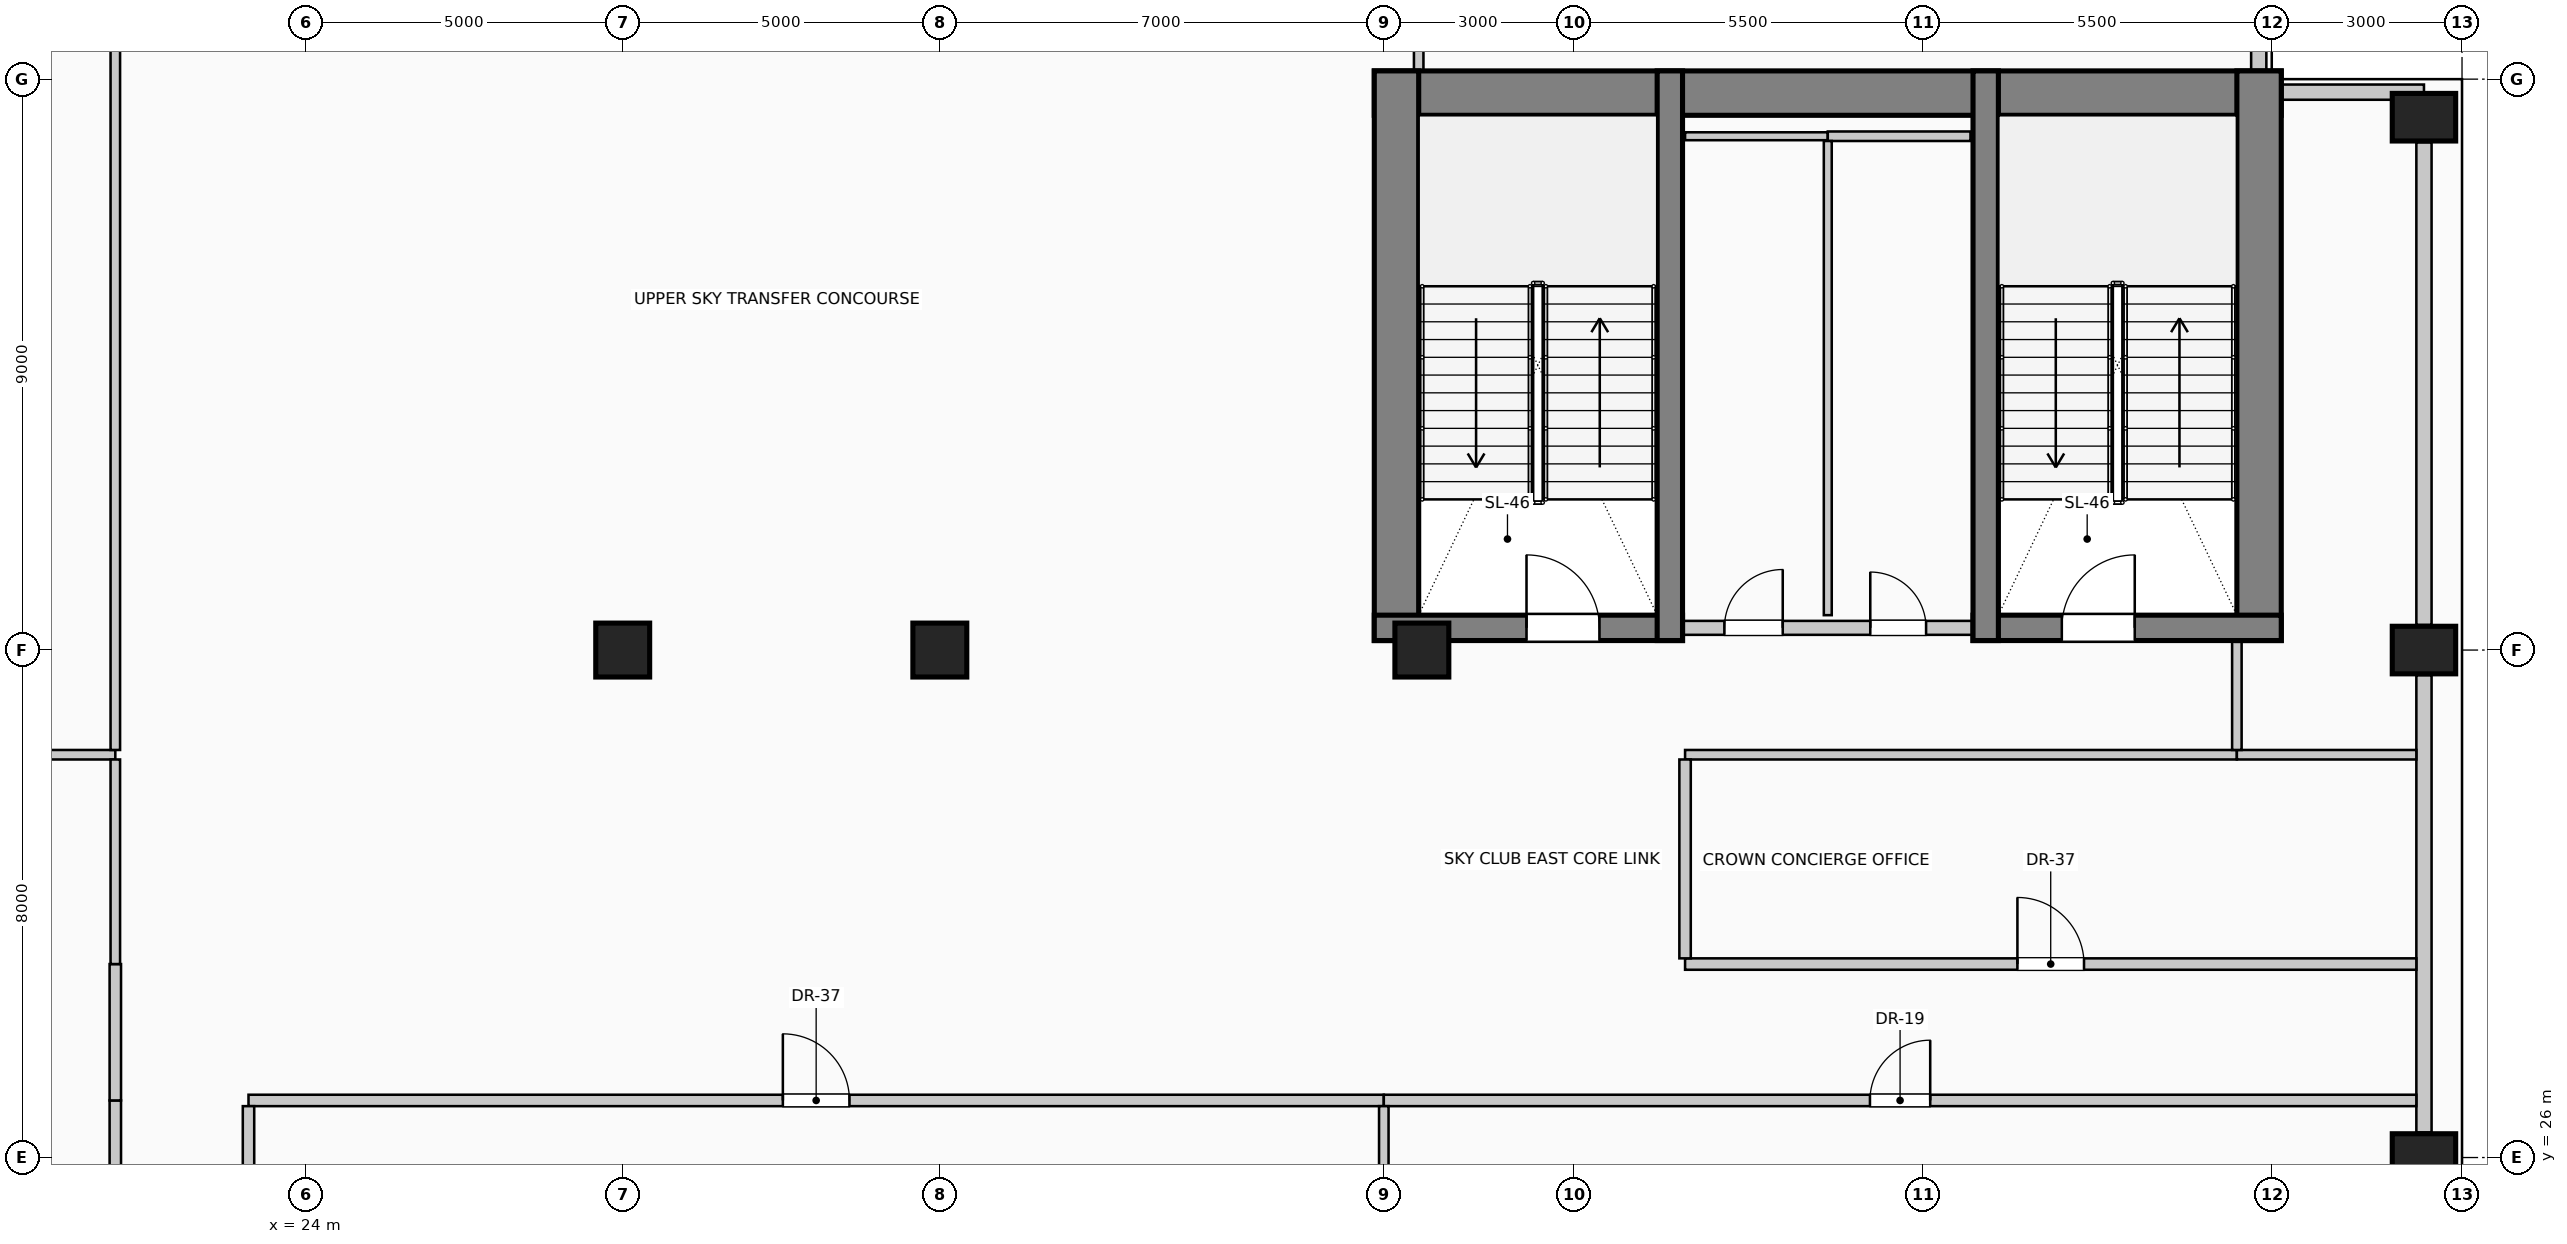
"""IFC4 building model, lengths in metres.
Left out: names, types, materials, properties, quantities, classifications, styles, units other than length and angle.
Written with IfcOpenShell. Run it as: python <this file> out.ifc"""

import sys

from ifc_helpers import new_model, si_unit, direction, frame, frame_2d, origin, origin_2d, place, context, subcontext, project, spatial, rectangle, circle, extrude, element, fill, save


model = new_model("IFC4")
c1 = context("Model", 3, precision=1e-05, world=origin(), true_north=direction((0.0, 1.0)))
c2 = subcontext(c1, "Body", "Model", "MODEL_VIEW")
j1 = project(units=[si_unit("LENGTHUNIT", "METRE"), si_unit("PLANEANGLEUNIT", "RADIAN")], contexts=[c1])
p1 = place(None, origin())
s1 = spatial("IfcSite", under=j1, at=p1, CompositionType="ELEMENT")
p2 = place(p1, origin())
s2 = spatial("IfcBuilding", under=s1, at=p2, CompositionType="ELEMENT")
p3 = place(p2, frame((0.0, 0.0, 243.8)))
s3 = spatial("IfcBuildingStorey", under=s2, at=p3, CompositionType="ELEMENT", Elevation=243.8)
p4 = place(p3, frame((40.85, 42.78, 0.0), z_axis=(0.0, 0.0, 1.0), x_axis=(1.0, 0.0, 0.0)))
e1 = element("IfcWall", 1, at=p4, inside=s3, PredefinedType="SHEAR", context=c2, shape_type="SweptSolid", body=[
    extrude(rectangle(XDim=14.3, YDim=0.7, at=frame_2d((7.15, 0.0))), origin(), (0.0, 0.0, 1.0), 4.8),
])
for number, where, z_axis, x_axis in (
    (2, (41.2, 34.15, 0.0), (0.0, 0.0, 1.0), (0.0, 1.0, 0.0)),
    (3, (54.8, 34.15, 0.0), (0.0, 0.0, 1.0), (0.0, 1.0, 0.0)),
):
    element("IfcWall", number, at=place(p3, frame(where, z_axis=z_axis, x_axis=x_axis)), inside=s3, PredefinedType="SHEAR", context=c2, shape_type="SweptSolid", body=[
        extrude(rectangle(XDim=8.98, YDim=0.7, at=frame_2d((4.49, 0.0))), origin(), (0.0, 0.0, 1.0), 4.8),
    ])
p5 = place(p3, frame((40.85, 34.35, 0.0), z_axis=(0.0, 0.0, 1.0), x_axis=(1.0, 0.0, 0.0)))
e4 = element("IfcWall", 4, at=p5, inside=s3, PredefinedType="SHEAR", context=c2, shape_type="SweptSolid", body=[
    extrude(rectangle(XDim=4.86, YDim=0.4, at=frame_2d((2.43, 0.0))), origin(), (0.0, 0.0, 1.0), 4.8),
])
p6 = place(p5, frame((2.4, 0.0, 0.0)))
e5 = element("IfcOpeningElement", 5, at=p6, cuts=e4, PredefinedType="OPENING", context=c2, shape_type="SweptSolid", body=[
    extrude(rectangle(XDim=1.15, YDim=2.2, at=frame_2d((0.575, 1.1))), frame((0.0, 0.21, 0.0), z_axis=(0.0, -1.0, 0.0), x_axis=(1.0, 0.0, 0.0)), (0.0, 0.0, 1.0), 0.42),
])
p7 = place(p3, frame((45.51, 34.15, 0.0), z_axis=(0.0, 0.0, 1.0), x_axis=(0.0, 1.0, 0.0)))
e6 = element("IfcWall", 6, at=p7, inside=s3, PredefinedType="SHEAR", context=c2, shape_type="SweptSolid", body=[
    extrude(rectangle(XDim=8.98, YDim=0.4, at=frame_2d((4.49, 0.0))), origin(), (0.0, 0.0, 1.0), 4.8),
])
p8 = place(p3, frame((50.29, 34.35, 0.0), z_axis=(0.0, 0.0, 1.0), x_axis=(1.0, 0.0, 0.0)))
e7 = element("IfcWall", 7, at=p8, inside=s3, PredefinedType="SHEAR", context=c2, shape_type="SweptSolid", body=[
    extrude(rectangle(XDim=4.86, YDim=0.4, at=frame_2d((2.43, 0.0))), origin(), (0.0, 0.0, 1.0), 4.8),
])
p9 = place(p8, frame((1.4, 0.0, 0.0)))
e8 = element("IfcOpeningElement", 8, at=p9, cuts=e7, PredefinedType="OPENING", context=c2, shape_type="SweptSolid", body=[
    extrude(rectangle(XDim=1.15, YDim=2.2, at=frame_2d((0.575, 1.1))), frame((0.0, 0.21, 0.0), z_axis=(0.0, -1.0, 0.0), x_axis=(1.0, 0.0, 0.0)), (0.0, 0.0, 1.0), 0.42),
])
p10 = place(p3, frame((50.49, 34.15, 0.0), z_axis=(0.0, 0.0, 1.0), x_axis=(0.0, 1.0, 0.0)))
e9 = element("IfcWall", 9, at=p10, inside=s3, PredefinedType="SHEAR", context=c2, shape_type="SweptSolid", body=[
    extrude(rectangle(XDim=8.98, YDim=0.4, at=frame_2d((4.49, 0.0))), origin(), (0.0, 0.0, 1.0), 4.8),
])
for number, where, z_axis, x_axis in (
    (10, (57.4, 26.0, 0.0), (0.0, 0.0, 1.0), (0.0, 1.0, 0.0)),
    (11, (57.4, 34.0, 0.0), (0.0, 0.0, 1.0), (0.0, 1.0, 0.0)),
    (12, (57.4, 42.4, 0.0), (0.0, 0.0, 1.0), (0.0, 1.0, 0.0)),
):
    element("IfcColumn", number, at=place(p3, frame(where, z_axis=z_axis, x_axis=x_axis)), inside=s3, PredefinedType="COLUMN", context=c2, shape_type="SweptSolid", body=[
        extrude(rectangle(XDim=0.75, YDim=1.0, at=origin_2d()), origin(), (0.0, 0.0, 1.0), 4.8),
    ])
for number, where, z_axis, x_axis in (
    (13, (29.0, 34.0, 0.0), (0.0, 0.0, 1.0), (1.0, 0.0, 0.0)),
    (14, (41.6, 34.0, 0.0), (0.0, 0.0, 1.0), (1.0, 0.0, 0.0)),
    (15, (34.0, 34.0, 0.0), (0.0, 0.0, 1.0), (1.0, 0.0, 0.0)),
):
    element("IfcColumn", number, at=place(p3, frame(where, z_axis=z_axis, x_axis=x_axis)), inside=s3, PredefinedType="COLUMN", context=c2, shape_type="SweptSolid", body=[
        extrude(circle(Radius=0.425, at=origin_2d()), origin(), (0.0, 0.0, 1.0), 4.8),
    ])
p11 = place(p3, frame((57.4, 33.605, 0.0), z_axis=(0.0, 0.0, 1.0), x_axis=(0.0, -1.0, 0.0)))
e16 = element("IfcWall", 16, at=p11, inside=s3, PredefinedType="SOLIDWALL", context=c2, shape_type="SweptSolid", body=[
    extrude(rectangle(XDim=7.21, YDim=0.24, at=frame_2d((3.605, 0.0))), origin(), (0.0, 0.0, 1.0), 3.8),
])
p12 = place(p3, frame((57.4, 42.005, 0.0), z_axis=(0.0, 0.0, 1.0), x_axis=(0.0, -1.0, 0.0)))
e17 = element("IfcWall", 17, at=p12, inside=s3, PredefinedType="SOLIDWALL", context=c2, shape_type="SweptSolid", body=[
    extrude(rectangle(XDim=7.61, YDim=0.24, at=frame_2d((3.805, 0.0))), origin(), (0.0, 0.0, 1.0), 3.8),
])
p13 = place(p3, frame((54.795, 45.4, 0.0), z_axis=(0.0, 0.0, 1.0), x_axis=(0.0, -1.0, 0.0)))
e18 = element("IfcWall", 18, at=p13, inside=s3, PredefinedType="SOLIDWALL", context=c2, shape_type="SweptSolid", body=[
    extrude(rectangle(XDim=2.265, YDim=0.24, at=frame_2d((1.132, 0.0))), origin(), (0.0, 0.0, 1.0), 4.55),
])
p14 = place(p3, frame((55.155, 42.795, 0.0), z_axis=(0.0, 0.0, 1.0), x_axis=(1.0, 0.0, 0.0)))
e19 = element("IfcWall", 19, at=p14, inside=s3, PredefinedType="SOLIDWALL", context=c2, shape_type="SweptSolid", body=[
    extrude(rectangle(XDim=2.245, YDim=0.24, at=frame_2d((1.123, 0.0))), origin(), (0.0, 0.0, 1.0), 4.55),
])
p15 = place(p3, frame((45.72, 34.35, 0.0), z_axis=(0.0, 0.0, 1.0), x_axis=(1.0, 0.0, 0.0)))
e20 = element("IfcWall", 20, at=p15, inside=s3, PredefinedType="PARTITIONING", context=c2, shape_type="SweptSolid", body=[
    extrude(rectangle(XDim=4.56, YDim=0.22, at=frame_2d((2.28, 0.0))), origin(), (0.0, 0.0, 1.0), 4.55),
])
p16 = place(p15, frame((0.65, 0.0, 0.0)))
e21 = element("IfcOpeningElement", 21, at=p16, cuts=e20, PredefinedType="OPENING", context=c2, shape_type="SweptSolid", body=[
    extrude(rectangle(XDim=0.92, YDim=2.1, at=frame_2d((0.46, 1.05))), frame((0.0, 0.12, 0.0), z_axis=(0.0, -1.0, 0.0), x_axis=(1.0, 0.0, 0.0)), (0.0, 0.0, 1.0), 0.24),
])
p17 = place(p15, frame((2.95, 0.0, 0.0)))
e22 = element("IfcOpeningElement", 22, at=p17, cuts=e20, PredefinedType="OPENING", context=c2, shape_type="SweptSolid", body=[
    extrude(rectangle(XDim=0.88, YDim=2.1, at=frame_2d((0.44, 1.05))), frame((0.0, 0.12, 0.0), z_axis=(0.0, -1.0, 0.0), x_axis=(1.0, 0.0, 0.0)), (0.0, 0.0, 1.0), 0.24),
])
p18 = place(p3, frame((23.1, 26.9, 0.0), z_axis=(0.0, 0.0, 1.0), x_axis=(1.0, 0.0, 0.0)))
e23 = element("IfcWall", 23, at=p18, inside=s3, PredefinedType="PARTITIONING", context=c2, shape_type="SweptSolid", body=[
    extrude(rectangle(XDim=17.9, YDim=0.18, at=frame_2d((8.95, 0.0))), origin(), (0.0, 0.0, 1.0), 4.55),
])
p19 = place(p18, frame((8.425, 0.0, 0.0)))
e24 = element("IfcOpeningElement", 24, at=p19, cuts=e23, PredefinedType="OPENING", context=c2, shape_type="SweptSolid", body=[
    extrude(rectangle(XDim=1.05, YDim=2.15, at=frame_2d((0.525, 1.075))), frame((0.0, 0.1, 0.0), z_axis=(0.0, -1.0, 0.0), x_axis=(1.0, 0.0, 0.0)), (0.0, 0.0, 1.0), 0.2),
])
p20 = place(p3, frame((41.0, 26.9, 0.0), z_axis=(0.0, 0.0, 1.0), x_axis=(1.0, 0.0, 0.0)))
e25 = element("IfcWall", 25, at=p20, inside=s3, PredefinedType="PARTITIONING", context=c2, shape_type="SweptSolid", body=[
    extrude(rectangle(XDim=16.28, YDim=0.18, at=frame_2d((8.14, 0.0))), origin(), (0.0, 0.0, 1.0), 4.55),
])
p21 = place(p20, frame((7.665, 0.0, 0.0)))
e26 = element("IfcOpeningElement", 26, at=p21, cuts=e25, PredefinedType="OPENING", context=c2, shape_type="SweptSolid", body=[
    extrude(rectangle(XDim=0.95, YDim=2.15, at=frame_2d((0.475, 1.075))), frame((0.0, 0.1, 0.0), z_axis=(0.0, -1.0, 0.0), x_axis=(1.0, 0.0, 0.0)), (0.0, 0.0, 1.0), 0.2),
])
p22 = place(p3, frame((45.75, 29.05, 0.0), z_axis=(0.0, 0.0, 1.0), x_axis=(1.0, 0.0, 0.0)))
e27 = element("IfcWall", 27, at=p22, inside=s3, PredefinedType="PARTITIONING", context=c2, shape_type="SweptSolid", body=[
    extrude(rectangle(XDim=11.53, YDim=0.18, at=frame_2d((5.765, 0.0))), origin(), (0.0, 0.0, 1.0), 4.55),
])
p23 = place(p22, frame((5.24, 0.0, 0.0)))
e28 = element("IfcOpeningElement", 28, at=p23, cuts=e27, PredefinedType="OPENING", context=c2, shape_type="SweptSolid", body=[
    extrude(rectangle(XDim=1.05, YDim=2.15, at=frame_2d((0.525, 1.075))), frame((0.0, 0.1, 0.0), z_axis=(0.0, -1.0, 0.0), x_axis=(1.0, 0.0, 0.0)), (0.0, 0.0, 1.0), 0.2),
])
p24 = place(p3, frame((15.85, 32.35, 0.0), z_axis=(0.0, 0.0, 1.0), x_axis=(1.0, 0.0, 0.0)))
e29 = element("IfcWall", 29, at=p24, inside=s3, PredefinedType="PARTITIONING", context=c2, shape_type="SweptSolid", body=[
    extrude(rectangle(XDim=5.15, YDim=0.15, at=frame_2d((2.575, 0.0))), origin(), (0.0, 0.0, 1.0), 4.55),
])
p25 = place(p3, frame((45.75, 32.35, 0.0), z_axis=(0.0, 0.0, 1.0), x_axis=(1.0, 0.0, 0.0)))
e30 = element("IfcWall", 30, at=p25, inside=s3, PredefinedType="PARTITIONING", context=c2, shape_type="SweptSolid", body=[
    extrude(rectangle(XDim=8.7, YDim=0.15, at=frame_2d((4.35, 0.0))), origin(), (0.0, 0.0, 1.0), 4.55),
])
p26 = place(p3, frame((54.45, 32.35, 0.0), z_axis=(0.0, 0.0, 1.0), x_axis=(1.0, 0.0, 0.0)))
e31 = element("IfcWall", 31, at=p26, inside=s3, PredefinedType="PARTITIONING", context=c2, shape_type="SweptSolid", body=[
    extrude(rectangle(XDim=2.83, YDim=0.15, at=frame_2d((1.415, 0.0))), origin(), (0.0, 0.0, 1.0), 4.55),
])
p27 = place(p3, frame((45.75, 42.1, 0.0), z_axis=(0.0, 0.0, 1.0), x_axis=(1.0, 0.0, 0.0)))
e32 = element("IfcWall", 32, at=p27, inside=s3, PredefinedType="PARTITIONING", context=c2, shape_type="SweptSolid", body=[
    extrude(rectangle(XDim=2.25, YDim=0.125, at=frame_2d((1.125, 0.0))), origin(), (0.0, 0.0, 1.0), 4.55),
])
p28 = place(p3, frame((48.0, 42.1, 0.0), z_axis=(0.0, 0.0, 1.0), x_axis=(1.0, 0.0, 0.0)))
e33 = element("IfcWall", 33, at=p28, inside=s3, PredefinedType="PARTITIONING", context=c2, shape_type="SweptSolid", body=[
    extrude(rectangle(XDim=2.25, YDim=0.15, at=frame_2d((1.125, 0.0))), origin(), (0.0, 0.0, 1.0), 4.55),
])
p29 = place(p3, frame((21.0, 24.875, 0.0), z_axis=(0.0, 0.0, 1.0), x_axis=(0.0, 1.0, 0.0)))
e34 = element("IfcWall", 34, at=p29, inside=s3, PredefinedType="PARTITIONING", context=c2, shape_type="SweptSolid", body=[
    extrude(rectangle(XDim=2.025, YDim=0.18, at=frame_2d((1.012, 0.0))), origin(), (0.0, 0.0, 1.0), 4.55),
])
p30 = place(p3, frame((21.0, 26.9, 0.0), z_axis=(0.0, 0.0, 1.0), x_axis=(0.0, 1.0, 0.0)))
e35 = element("IfcWall", 35, at=p30, inside=s3, PredefinedType="PARTITIONING", context=c2, shape_type="SweptSolid", body=[
    extrude(rectangle(XDim=2.15, YDim=0.18, at=frame_2d((1.075, 0.0))), origin(), (0.0, 0.0, 1.0), 4.55),
])
p31 = place(p3, frame((21.0, 29.05, 0.0), z_axis=(0.0, 0.0, 1.0), x_axis=(0.0, 1.0, 0.0)))
e36 = element("IfcWall", 36, at=p31, inside=s3, PredefinedType="PARTITIONING", context=c2, shape_type="SweptSolid", body=[
    extrude(rectangle(XDim=3.225, YDim=0.15, at=frame_2d((1.612, 0.0))), origin(), (0.0, 0.0, 1.0), 4.55),
])
p32 = place(p3, frame((21.0, 32.425, 0.0), z_axis=(0.0, 0.0, 1.0), x_axis=(0.0, 1.0, 0.0)))
e37 = element("IfcWall", 37, at=p32, inside=s3, PredefinedType="PARTITIONING", context=c2, shape_type="SweptSolid", body=[
    extrude(rectangle(XDim=12.855, YDim=0.15, at=frame_2d((6.427, 0.0))), origin(), (0.0, 0.0, 1.0), 4.55),
])
p33 = place(p3, frame((23.1, 17.3, 0.0), z_axis=(0.0, 0.0, 1.0), x_axis=(0.0, 1.0, 0.0)))
e38 = element("IfcWall", 38, at=p33, inside=s3, PredefinedType="PARTITIONING", context=c2, shape_type="SweptSolid", body=[
    extrude(rectangle(XDim=9.51, YDim=0.18, at=frame_2d((4.755, 0.0))), origin(), (0.0, 0.0, 1.0), 4.55),
])
p34 = place(p3, frame((41.0, 1.25, 0.0), z_axis=(0.0, 0.0, 1.0), x_axis=(0.0, 1.0, 0.0)))
e39 = element("IfcWall", 39, at=p34, inside=s3, PredefinedType="PARTITIONING", context=c2, shape_type="SweptSolid", body=[
    extrude(rectangle(XDim=25.56, YDim=0.15, at=frame_2d((12.78, 0.0))), origin(), (0.0, 0.0, 1.0), 4.55),
])
p35 = place(p3, frame((41.55, 43.13, 0.0), z_axis=(0.0, 0.0, 1.0), x_axis=(0.0, 1.0, 0.0)))
e40 = element("IfcWall", 40, at=p35, inside=s3, PredefinedType="PARTITIONING", context=c2, shape_type="SweptSolid", body=[
    extrude(rectangle(XDim=1.62, YDim=0.15, at=frame_2d((0.81, 0.0))), origin(), (0.0, 0.0, 1.0), 4.55),
])
p36 = place(p3, frame((45.75, 29.14, 0.0), z_axis=(0.0, 0.0, 1.0), x_axis=(0.0, 1.0, 0.0)))
e41 = element("IfcWall", 41, at=p36, inside=s3, PredefinedType="PARTITIONING", context=c2, shape_type="SweptSolid", body=[
    extrude(rectangle(XDim=3.135, YDim=0.18, at=frame_2d((1.567, 0.0))), origin(), (0.0, 0.0, 1.0), 4.55),
])
p37 = place(p3, frame((48.0, 34.55, 0.0), z_axis=(0.0, 0.0, 1.0), x_axis=(0.0, 1.0, 0.0)))
e42 = element("IfcWall", 42, at=p37, inside=s3, PredefinedType="PARTITIONING", context=c2, shape_type="SweptSolid", body=[
    extrude(rectangle(XDim=7.475, YDim=0.125, at=frame_2d((3.737, 0.0))), origin(), (0.0, 0.0, 1.0), 4.55),
])
p38 = place(p3, frame((54.45, 32.425, 0.0), z_axis=(0.0, 0.0, 1.0), x_axis=(0.0, 1.0, 0.0)))
e43 = element("IfcWall", 43, at=p38, inside=s3, PredefinedType="PARTITIONING", context=c2, shape_type="SweptSolid", body=[
    extrude(rectangle(XDim=1.725, YDim=0.15, at=frame_2d((0.862, 0.0))), origin(), (0.0, 0.0, 1.0), 4.55),
])
p39 = place(p6, origin())
e44 = element("IfcDoor", 44, at=p39, inside=s3, OperationType="SINGLE_SWING_LEFT", PredefinedType="DOOR", context=c2, shape_type="SweptSolid", body=[
    extrude(rectangle(XDim=1.15, YDim=2.2, at=frame_2d((0.575, 1.1))), frame((0.0, 0.025, 0.0), z_axis=(0.0, -1.0, 0.0), x_axis=(1.0, 0.0, 0.0)), (0.0, 0.0, 1.0), 0.05),
])
fill(e5, e44)
p40 = place(p16, origin())
e45 = element("IfcDoor", 45, at=p40, inside=s3, OperationType="SINGLE_SWING_RIGHT", PredefinedType="DOOR", context=c2, shape_type="SweptSolid", body=[
    extrude(rectangle(XDim=0.92, YDim=2.1, at=frame_2d((0.46, 1.05))), frame((0.0, 0.025, 0.0), z_axis=(0.0, -1.0, 0.0), x_axis=(1.0, 0.0, 0.0)), (0.0, 0.0, 1.0), 0.05),
])
fill(e21, e45)
p41 = place(p17, origin())
e46 = element("IfcDoor", 46, at=p41, inside=s3, OperationType="SINGLE_SWING_LEFT", PredefinedType="DOOR", context=c2, shape_type="SweptSolid", body=[
    extrude(rectangle(XDim=0.88, YDim=2.1, at=frame_2d((0.44, 1.05))), frame((0.0, 0.025, 0.0), z_axis=(0.0, -1.0, 0.0), x_axis=(1.0, 0.0, 0.0)), (0.0, 0.0, 1.0), 0.05),
])
fill(e22, e46)
p42 = place(p9, origin())
e47 = element("IfcDoor", 47, at=p42, inside=s3, OperationType="SINGLE_SWING_RIGHT", PredefinedType="DOOR", context=c2, shape_type="SweptSolid", body=[
    extrude(rectangle(XDim=1.15, YDim=2.2, at=frame_2d((0.575, 1.1))), frame((0.0, 0.025, 0.0), z_axis=(0.0, -1.0, 0.0), x_axis=(1.0, 0.0, 0.0)), (0.0, 0.0, 1.0), 0.05),
])
fill(e8, e47)
p43 = place(p19, origin())
e48 = element("IfcDoor", 48, at=p43, inside=s3, OperationType="SINGLE_SWING_LEFT", PredefinedType="DOOR", context=c2, shape_type="SweptSolid", body=[
    extrude(rectangle(XDim=1.05, YDim=2.15, at=frame_2d((0.525, 1.075))), frame((0.0, 0.025, 0.0), z_axis=(0.0, -1.0, 0.0), x_axis=(1.0, 0.0, 0.0)), (0.0, 0.0, 1.0), 0.05),
])
fill(e24, e48)
p44 = place(p21, origin())
e49 = element("IfcDoor", 49, at=p44, inside=s3, OperationType="SINGLE_SWING_RIGHT", PredefinedType="DOOR", context=c2, shape_type="SweptSolid", body=[
    extrude(rectangle(XDim=0.95, YDim=2.15, at=frame_2d((0.475, 1.075))), frame((0.0, 0.025, 0.0), z_axis=(0.0, -1.0, 0.0), x_axis=(1.0, 0.0, 0.0)), (0.0, 0.0, 1.0), 0.05),
])
fill(e26, e49)
p45 = place(p23, origin())
e50 = element("IfcDoor", 50, at=p45, inside=s3, OperationType="SINGLE_SWING_LEFT", PredefinedType="DOOR", context=c2, shape_type="SweptSolid", body=[
    extrude(rectangle(XDim=1.05, YDim=2.15, at=frame_2d((0.525, 1.075))), frame((0.0, 0.025, 0.0), z_axis=(0.0, -1.0, 0.0), x_axis=(1.0, 0.0, 0.0)), (0.0, 0.0, 1.0), 0.05),
])
fill(e28, e50)
save(model, sys.argv[1])
